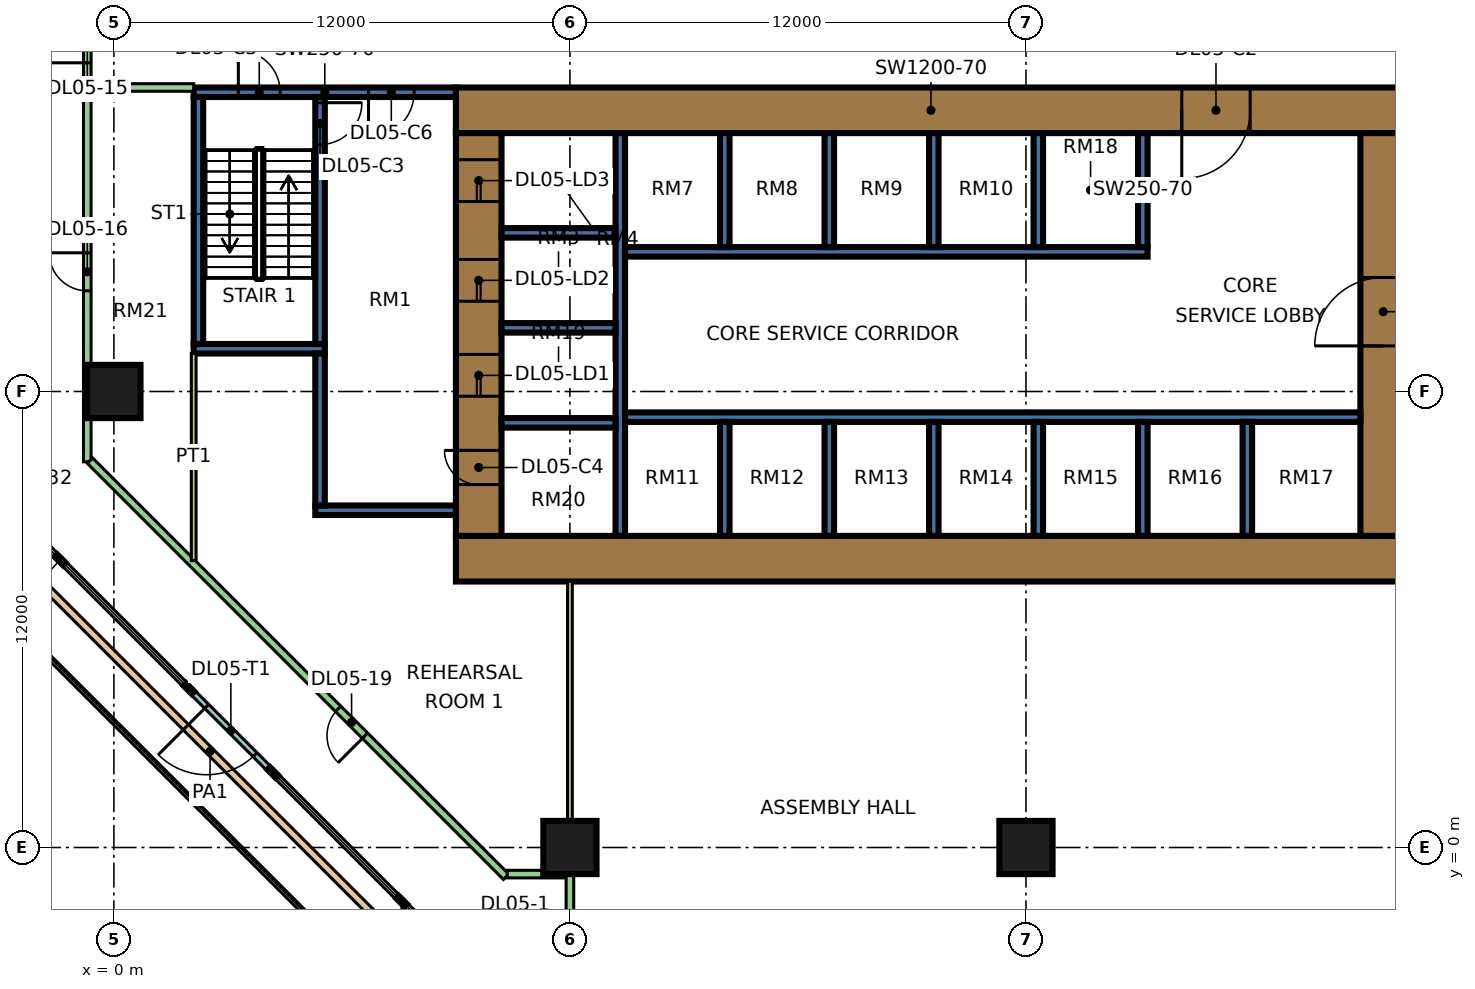
"""IFC4 building model, lengths in metres.
Left out: names, types, materials, properties, quantities, classifications, styles, units other than length and angle.
Written with IfcOpenShell. Run it as: python <this file> out.ifc"""

import sys

from ifc_helpers import new_model, si_unit, direction, frame, frame_2d, origin, origin_2d, place, context, subcontext, project, spatial, rectangle, extrude, element, fill, save


model = new_model("IFC4")
c1 = context("Model", 3, precision=1e-05, world=origin(), true_north=direction((0.0, 1.0)))
c2 = subcontext(c1, "Body", "Model", "MODEL_VIEW")
j1 = project(units=[si_unit("LENGTHUNIT", "METRE"), si_unit("PLANEANGLEUNIT", "RADIAN")], contexts=[c1])
p1 = place(None, origin())
s1 = spatial("IfcSite", under=j1, at=p1, CompositionType="ELEMENT")
p2 = place(p1, origin())
s2 = spatial("IfcBuilding", under=s1, at=p2, CompositionType="ELEMENT")
p3 = place(p2, frame((0.0, 0.0, 26.4)))
s3 = spatial("IfcBuildingStorey", under=s2, at=p3, CompositionType="ELEMENT", Elevation=26.4)
for number, where, z_axis, x_axis in (
    (1, (12.0, 0.0, 0.0), (0.0, 0.0, 1.0), (1.0, 0.0, 0.0)),
    (2, (24.0, 0.0, 0.0), (0.0, 0.0, 1.0), (1.0, 0.0, 0.0)),
    (3, (0.0, 12.0, 0.0), (0.0, 0.0, 1.0), (1.0, 0.0, 0.0)),
):
    element("IfcColumn", number, at=place(p3, frame(where, z_axis=z_axis, x_axis=x_axis)), inside=s3, PredefinedType="COLUMN", context=c2, shape_type="SweptSolid", body=[
        extrude(rectangle(XDim=1.4, YDim=1.4, at=origin_2d()), origin(), (0.0, 0.0, 1.0), 9.0),
    ])
p4 = place(p3, frame((9.0, 7.6, 0.0), z_axis=(0.0, 0.0, 1.0), x_axis=(1.0, 0.0, 0.0)))
e4 = element("IfcWall", 4, at=p4, inside=s3, PredefinedType="SHEAR", context=c2, shape_type="SweptSolid", body=[
    extrude(rectangle(XDim=25.0, YDim=1.2, at=frame_2d((12.5, 0.0))), origin(), (0.0, 0.0, 1.0), 9.0),
])
p5 = place(p3, frame((9.0, 19.4, 0.0), z_axis=(0.0, 0.0, 1.0), x_axis=(1.0, 0.0, 0.0)))
e5 = element("IfcWall", 5, at=p5, inside=s3, PredefinedType="SHEAR", context=c2, shape_type="SweptSolid", body=[
    extrude(rectangle(XDim=25.0, YDim=1.2, at=frame_2d((12.5, 0.0))), origin(), (0.0, 0.0, 1.0), 9.0),
])
p6 = place(p5, frame((19.1, 0.0, 0.0)))
e6 = element("IfcOpeningElement", 6, at=p6, cuts=e5, PredefinedType="OPENING", context=c2, shape_type="SweptSolid", body=[
    extrude(rectangle(XDim=1.8, YDim=2.4, at=frame_2d((0.9, 1.2))), frame((0.0, 0.61, 0.0), z_axis=(0.0, -1.0, 0.0), x_axis=(1.0, 0.0, 0.0)), (0.0, 0.0, 1.0), 1.22),
])
p7 = place(p3, frame((9.6, 8.2, 0.0), z_axis=(0.0, 0.0, 1.0), x_axis=(0.0, 1.0, 0.0)))
e7 = element("IfcWall", 7, at=p7, inside=s3, PredefinedType="SHEAR", context=c2, shape_type="SweptSolid", body=[
    extrude(rectangle(XDim=10.6, YDim=1.2, at=frame_2d((5.3, 0.0))), origin(), (0.0, 0.0, 1.0), 9.0),
])
p8 = place(p7, frame((3.675, 0.0, 0.0)))
e8 = element("IfcOpeningElement", 8, at=p8, cuts=e7, PredefinedType="OPENING", context=c2, shape_type="SweptSolid", body=[
    extrude(rectangle(XDim=1.1, YDim=2.2, at=frame_2d((0.55, 1.1))), frame((0.0, 0.61, 0.0), z_axis=(0.0, -1.0, 0.0), x_axis=(1.0, 0.0, 0.0)), (0.0, 0.0, 1.0), 1.22),
])
p9 = place(p7, frame((6.175, 0.0, 0.0)))
e9 = element("IfcOpeningElement", 9, at=p9, cuts=e7, PredefinedType="OPENING", context=c2, shape_type="SweptSolid", body=[
    extrude(rectangle(XDim=1.1, YDim=2.2, at=frame_2d((0.55, 1.1))), frame((0.0, 0.61, 0.0), z_axis=(0.0, -1.0, 0.0), x_axis=(1.0, 0.0, 0.0)), (0.0, 0.0, 1.0), 1.22),
])
p10 = place(p7, frame((8.8, 0.0, 0.0)))
e10 = element("IfcOpeningElement", 10, at=p10, cuts=e7, PredefinedType="OPENING", context=c2, shape_type="SweptSolid", body=[
    extrude(rectangle(XDim=1.1, YDim=2.2, at=frame_2d((0.55, 1.1))), frame((0.0, 0.61, 0.0), z_axis=(0.0, -1.0, 0.0), x_axis=(1.0, 0.0, 0.0)), (0.0, 0.0, 1.0), 1.22),
])
p11 = place(p7, frame((1.35, 0.0, 0.0)))
e11 = element("IfcOpeningElement", 11, at=p11, cuts=e7, PredefinedType="OPENING", context=c2, shape_type="SweptSolid", body=[
    extrude(rectangle(XDim=0.9, YDim=2.1, at=frame_2d((0.45, 1.05))), frame((0.0, 0.61, 0.0), z_axis=(0.0, -1.0, 0.0), x_axis=(1.0, 0.0, 0.0)), (0.0, 0.0, 1.0), 1.22),
])
p12 = place(p3, frame((33.4, 8.2, 0.0), z_axis=(0.0, 0.0, 1.0), x_axis=(0.0, 1.0, 0.0)))
e12 = element("IfcWall", 12, at=p12, inside=s3, PredefinedType="SHEAR", context=c2, shape_type="SweptSolid", body=[
    extrude(rectangle(XDim=10.6, YDim=1.2, at=frame_2d((5.3, 0.0))), origin(), (0.0, 0.0, 1.0), 9.0),
])
p13 = place(p12, frame((5.0, 0.0, 0.0)))
e13 = element("IfcOpeningElement", 13, at=p13, cuts=e12, PredefinedType="OPENING", context=c2, shape_type="SweptSolid", body=[
    extrude(rectangle(XDim=1.8, YDim=2.4, at=frame_2d((0.9, 1.2))), frame((0.0, 0.61, 0.0), z_axis=(0.0, -1.0, 0.0), x_axis=(1.0, 0.0, 0.0)), (0.0, 0.0, 1.0), 1.22),
])
p14 = place(p3, frame((13.325, 8.2, 0.0), z_axis=(0.0, 0.0, 1.0), x_axis=(0.0, 1.0, 0.0)))
e14 = element("IfcWall", 14, at=p14, inside=s3, PredefinedType="SHEAR", context=c2, shape_type="SweptSolid", body=[
    extrude(rectangle(XDim=10.6, YDim=0.25, at=frame_2d((5.3, 0.0))), origin(), (0.0, 0.0, 1.0), 9.0),
])
p15 = place(p3, frame((13.45, 11.325, 0.0), z_axis=(0.0, 0.0, 1.0), x_axis=(1.0, 0.0, 0.0)))
e15 = element("IfcWall", 15, at=p15, inside=s3, PredefinedType="SHEAR", context=c2, shape_type="SweptSolid", body=[
    extrude(rectangle(XDim=19.35, YDim=0.25, at=frame_2d((9.675, 0.0))), origin(), (0.0, 0.0, 1.0), 9.0),
])
p16 = place(p3, frame((13.45, 15.675, 0.0), z_axis=(0.0, 0.0, 1.0), x_axis=(1.0, 0.0, 0.0)))
e16 = element("IfcWall", 16, at=p16, inside=s3, PredefinedType="SHEAR", context=c2, shape_type="SweptSolid", body=[
    extrude(rectangle(XDim=13.75, YDim=0.25, at=frame_2d((6.875, 0.0))), origin(), (0.0, 0.0, 1.0), 9.0),
])
for number, where, z_axis, x_axis in (
    (17, (10.2, 11.175, 0.0), (0.0, 0.0, 1.0), (1.0, 0.0, 0.0)),
    (18, (10.2, 13.675, 0.0), (0.0, 0.0, 1.0), (1.0, 0.0, 0.0)),
    (19, (10.2, 16.175, 0.0), (0.0, 0.0, 1.0), (1.0, 0.0, 0.0)),
    (20, (16.075, 8.2, 0.0), (0.0, 0.0, 1.0), (0.0, 1.0, 0.0)),
    (21, (18.825, 8.2, 0.0), (0.0, 0.0, 1.0), (0.0, 1.0, 0.0)),
    (22, (21.575, 8.2, 0.0), (0.0, 0.0, 1.0), (0.0, 1.0, 0.0)),
    (23, (24.325, 8.2, 0.0), (0.0, 0.0, 1.0), (0.0, 1.0, 0.0)),
    (24, (27.075, 8.2, 0.0), (0.0, 0.0, 1.0), (0.0, 1.0, 0.0)),
    (25, (29.825, 8.2, 0.0), (0.0, 0.0, 1.0), (0.0, 1.0, 0.0)),
    (26, (16.075, 15.8, 0.0), (0.0, 0.0, 1.0), (0.0, 1.0, 0.0)),
    (27, (18.825, 15.8, 0.0), (0.0, 0.0, 1.0), (0.0, 1.0, 0.0)),
    (28, (21.575, 15.8, 0.0), (0.0, 0.0, 1.0), (0.0, 1.0, 0.0)),
    (29, (24.325, 15.8, 0.0), (0.0, 0.0, 1.0), (0.0, 1.0, 0.0)),
    (30, (27.075, 15.8, 0.0), (0.0, 0.0, 1.0), (0.0, 1.0, 0.0)),
):
    element("IfcWall", number, at=place(p3, frame(where, z_axis=z_axis, x_axis=x_axis)), inside=s3, PredefinedType="SHEAR", context=c2, shape_type="SweptSolid", body=[
        extrude(rectangle(XDim=3.0, YDim=0.25, at=frame_2d((1.5, 0.0))), origin(), (0.0, 0.0, 1.0), 9.0),
    ])
p17 = place(p3, frame((2.1, 19.875, 0.0), z_axis=(0.0, 0.0, 1.0), x_axis=(1.0, 0.0, 0.0)))
e31 = element("IfcWall", 31, at=p17, inside=s3, PredefinedType="SHEAR", context=c2, shape_type="SweptSolid", body=[
    extrude(rectangle(XDim=6.9, YDim=0.25, at=frame_2d((3.45, 0.0))), origin(), (0.0, 0.0, 1.0), 9.0),
])
p18 = place(p17, frame((1.175, 0.0, 0.0)))
e32 = element("IfcOpeningElement", 32, at=p18, cuts=e31, PredefinedType="OPENING", context=c2, shape_type="SweptSolid", body=[
    extrude(rectangle(XDim=1.1, YDim=2.2, at=frame_2d((0.55, 1.1))), frame((0.0, 0.135, 0.0), z_axis=(0.0, -1.0, 0.0), x_axis=(1.0, 0.0, 0.0)), (0.0, 0.0, 1.0), 0.27),
])
p19 = place(p17, frame((4.6, 0.0, 0.0)))
e33 = element("IfcOpeningElement", 33, at=p19, cuts=e31, PredefinedType="OPENING", context=c2, shape_type="SweptSolid", body=[
    extrude(rectangle(XDim=1.2, YDim=2.2, at=frame_2d((0.6, 1.1))), frame((0.0, 0.135, 0.0), z_axis=(0.0, -1.0, 0.0), x_axis=(1.0, 0.0, 0.0)), (0.0, 0.0, 1.0), 0.27),
])
p20 = place(p3, frame((2.1, 13.125, 0.0), z_axis=(0.0, 0.0, 1.0), x_axis=(1.0, 0.0, 0.0)))
e34 = element("IfcWall", 34, at=p20, inside=s3, PredefinedType="SHEAR", context=c2, shape_type="SweptSolid", body=[
    extrude(rectangle(XDim=3.45, YDim=0.25, at=frame_2d((1.725, 0.0))), origin(), (0.0, 0.0, 1.0), 9.0),
])
p21 = place(p3, frame((2.225, 13.25, 0.0), z_axis=(0.0, 0.0, 1.0), x_axis=(0.0, 1.0, 0.0)))
e35 = element("IfcWall", 35, at=p21, inside=s3, PredefinedType="SHEAR", context=c2, shape_type="SweptSolid", body=[
    extrude(rectangle(XDim=6.5, YDim=0.25, at=frame_2d((3.25, 0.0))), origin(), (0.0, 0.0, 1.0), 9.0),
])
p22 = place(p3, frame((5.425, 13.25, 0.0), z_axis=(0.0, 0.0, 1.0), x_axis=(0.0, 1.0, 0.0)))
e36 = element("IfcWall", 36, at=p22, inside=s3, PredefinedType="SHEAR", context=c2, shape_type="SweptSolid", body=[
    extrude(rectangle(XDim=6.5, YDim=0.25, at=frame_2d((3.25, 0.0))), origin(), (0.0, 0.0, 1.0), 9.0),
])
p23 = place(p22, frame((5.25, 0.0, 0.0)))
e37 = element("IfcOpeningElement", 37, at=p23, cuts=e36, PredefinedType="OPENING", context=c2, shape_type="SweptSolid", body=[
    extrude(rectangle(XDim=1.1, YDim=2.2, at=frame_2d((0.55, 1.1))), frame((0.0, 0.135, 0.0), z_axis=(0.0, -1.0, 0.0), x_axis=(1.0, 0.0, 0.0)), (0.0, 0.0, 1.0), 0.27),
])
p24 = place(p3, frame((5.3, 8.875, 0.0), z_axis=(0.0, 0.0, 1.0), x_axis=(1.0, 0.0, 0.0)))
e38 = element("IfcWall", 38, at=p24, inside=s3, PredefinedType="SHEAR", context=c2, shape_type="SweptSolid", body=[
    extrude(rectangle(XDim=3.7, YDim=0.25, at=frame_2d((1.85, 0.0))), origin(), (0.0, 0.0, 1.0), 9.0),
])
p25 = place(p3, frame((5.425, 9.0, 0.0), z_axis=(0.0, 0.0, 1.0), x_axis=(0.0, 1.0, 0.0)))
e39 = element("IfcWall", 39, at=p25, inside=s3, PredefinedType="SHEAR", context=c2, shape_type="SweptSolid", body=[
    extrude(rectangle(XDim=4.0, YDim=0.25, at=frame_2d((2.0, 0.0))), origin(), (0.0, 0.0, 1.0), 9.0),
])
p26 = place(p3, frame((2.018, 4.139, 0.0), z_axis=(0.0, 0.0, 1.0), x_axis=(0.707106781187, -0.707106781187, 0.0)))
e40 = element("IfcWall", 40, at=p26, inside=s3, PredefinedType="SOLIDWALL", context=c2, shape_type="SweptSolid", body=[
    extrude(rectangle(XDim=3.0, YDim=0.15, at=frame_2d((1.5, 0.0))), origin(), (0.0, 0.0, 1.0), 8.45),
])
p27 = place(p26, frame((0.6, 0.0, 0.0)))
e41 = element("IfcOpeningElement", 41, at=p27, cuts=e40, PredefinedType="OPENING", context=c2, shape_type="SweptSolid", body=[
    extrude(rectangle(XDim=1.8, YDim=2.4, at=frame_2d((0.9, 1.2))), frame((0.0, 0.085, 0.0), z_axis=(0.0, -1.0, 0.0), x_axis=(1.0, 0.0, 0.0)), (0.0, 0.0, 1.0), 0.17),
])
p28 = place(p3, frame((10.76, -5.7, 0.0), z_axis=(0.0, 0.0, 1.0), x_axis=(-0.707106781187, 0.707106781187, 0.0)))
e42 = element("IfcWall", 42, at=p28, inside=s3, PredefinedType="PARAPET", context=c2, shape_type="SweptSolid", body=[
    extrude(rectangle(XDim=23.278, YDim=0.2, at=frame_2d((11.639, 0.0))), origin(), (0.0, 0.0, 1.0), 0.5),
])
p29 = place(p3, frame((-0.7, 10.15, 0.0), z_axis=(0.0, 0.0, 1.0), x_axis=(0.0, 1.0, 0.0)))
e43 = element("IfcWall", 43, at=p29, inside=s3, PredefinedType="PARTITIONING", context=c2, shape_type="SweptSolid", body=[
    extrude(rectangle(XDim=15.85, YDim=0.2, at=frame_2d((7.925, 0.0))), origin(), (0.0, 0.0, 1.0), 8.45),
])
p30 = place(p29, frame((10.5, 0.0, 0.0)))
e44 = element("IfcOpeningElement", 44, at=p30, cuts=e43, PredefinedType="OPENING", context=c2, shape_type="SweptSolid", body=[
    extrude(rectangle(XDim=1.8, YDim=2.1, at=frame_2d((0.9, 1.05))), frame((0.0, 0.11, 0.0), z_axis=(0.0, -1.0, 0.0), x_axis=(1.0, 0.0, 0.0)), (0.0, 0.0, 1.0), 0.22),
])
p31 = place(p29, frame((4.5, 0.0, 0.0)))
e45 = element("IfcOpeningElement", 45, at=p31, cuts=e43, PredefinedType="OPENING", context=c2, shape_type="SweptSolid", body=[
    extrude(rectangle(XDim=1.0, YDim=2.1, at=frame_2d((0.5, 1.05))), frame((0.0, 0.11, 0.0), z_axis=(0.0, -1.0, 0.0), x_axis=(1.0, 0.0, 0.0)), (0.0, 0.0, 1.0), 0.22),
])
p32 = place(p3, frame((-0.629, 10.179, 0.0), z_axis=(0.0, 0.0, 1.0), x_axis=(0.707106781187, -0.707106781187, 0.0)))
e46 = element("IfcWall", 46, at=p32, inside=s3, PredefinedType="PARTITIONING", context=c2, shape_type="SweptSolid", body=[
    extrude(rectangle(XDim=15.486, YDim=0.2, at=frame_2d((7.743, 0.0))), origin(), (0.0, 0.0, 1.0), 8.45),
])
p33 = place(p32, frame((9.235, 0.0, 0.0)))
e47 = element("IfcOpeningElement", 47, at=p33, cuts=e46, PredefinedType="OPENING", context=c2, shape_type="SweptSolid", body=[
    extrude(rectangle(XDim=1.0, YDim=2.1, at=frame_2d((0.5, 1.05))), frame((0.0, 0.11, 0.0), z_axis=(0.0, -1.0, 0.0), x_axis=(1.0, 0.0, 0.0)), (0.0, 0.0, 1.0), 0.22),
])
p34 = place(p3, frame((-0.6, 20.0, 0.0), z_axis=(0.0, 0.0, 1.0), x_axis=(1.0, 0.0, 0.0)))
e48 = element("IfcWall", 48, at=p34, inside=s3, PredefinedType="PARTITIONING", context=c2, shape_type="SweptSolid", body=[
    extrude(rectangle(XDim=2.7, YDim=0.2, at=frame_2d((1.35, 0.0))), origin(), (0.0, 0.0, 1.0), 8.45),
])
p35 = place(p3, frame((2.1, 7.55, 0.0), z_axis=(0.0, 0.0, 1.0), x_axis=(0.0, 1.0, 0.0)))
e49 = element("IfcWall", 49, at=p35, inside=s3, PredefinedType="PARTITIONING", context=c2, shape_type="SweptSolid", body=[
    extrude(rectangle(XDim=5.45, YDim=0.125, at=frame_2d((2.725, 0.0))), origin(), (0.0, 0.0, 1.0), 8.45),
])
p36 = place(p3, frame((10.35, -0.7, 0.0), z_axis=(0.0, 0.0, 1.0), x_axis=(1.0, 0.0, 0.0)))
e50 = element("IfcWall", 50, at=p36, inside=s3, PredefinedType="PARTITIONING", context=c2, shape_type="SweptSolid", body=[
    extrude(rectangle(XDim=1.55, YDim=0.2, at=frame_2d((0.775, 0.0))), origin(), (0.0, 0.0, 1.0), 8.45),
])
p37 = place(p3, frame((12.0, -3.0, 0.0), z_axis=(0.0, 0.0, 1.0), x_axis=(0.0, 1.0, 0.0)))
e51 = element("IfcWall", 51, at=p37, inside=s3, PredefinedType="PARTITIONING", context=c2, shape_type="SweptSolid", body=[
    extrude(rectangle(XDim=2.3, YDim=0.2, at=frame_2d((1.15, 0.0))), origin(), (0.0, 0.0, 1.0), 8.45),
])
p38 = place(p3, frame((12.0, -0.7, 0.0), z_axis=(0.0, 0.0, 1.0), x_axis=(0.0, 1.0, 0.0)))
e52 = element("IfcWall", 52, at=p38, inside=s3, PredefinedType="PARTITIONING", context=c2, shape_type="SweptSolid", body=[
    extrude(rectangle(XDim=7.7, YDim=0.125, at=frame_2d((3.85, 0.0))), origin(), (0.0, 0.0, 1.0), 8.45),
])
p39 = place(p27, frame((1.8, 0.0, 0.0), z_axis=(0.0, 0.0, 1.0), x_axis=(-1.0, 0.0, 0.0)))
e53 = element("IfcDoor", 53, at=p39, inside=s3, OperationType="DOUBLE_DOOR_SINGLE_SWING", PredefinedType="DOOR", context=c2, shape_type="SweptSolid", body=[
    extrude(rectangle(XDim=1.8, YDim=2.4, at=frame_2d((0.9, 1.2))), frame((0.0, 0.025, 0.0), z_axis=(0.0, -1.0, 0.0), x_axis=(1.0, 0.0, 0.0)), (0.0, 0.0, 1.0), 0.05),
])
fill(e41, e53)
p40 = place(p8, origin())
e54 = element("IfcDoor", 54, at=p40, inside=s3, OperationType="DOUBLE_DOOR_SLIDING", PredefinedType="DOOR", context=c2, shape_type="SweptSolid", body=[
    extrude(rectangle(XDim=1.1, YDim=2.2, at=frame_2d((0.55, 1.1))), frame((0.0, 0.025, 0.0), z_axis=(0.0, -1.0, 0.0), x_axis=(1.0, 0.0, 0.0)), (0.0, 0.0, 1.0), 0.05),
])
fill(e8, e54)
p41 = place(p9, origin())
e55 = element("IfcDoor", 55, at=p41, inside=s3, OperationType="DOUBLE_DOOR_SLIDING", PredefinedType="DOOR", context=c2, shape_type="SweptSolid", body=[
    extrude(rectangle(XDim=1.1, YDim=2.2, at=frame_2d((0.55, 1.1))), frame((0.0, 0.025, 0.0), z_axis=(0.0, -1.0, 0.0), x_axis=(1.0, 0.0, 0.0)), (0.0, 0.0, 1.0), 0.05),
])
fill(e9, e55)
p42 = place(p10, origin())
e56 = element("IfcDoor", 56, at=p42, inside=s3, OperationType="DOUBLE_DOOR_SLIDING", PredefinedType="DOOR", context=c2, shape_type="SweptSolid", body=[
    extrude(rectangle(XDim=1.1, YDim=2.2, at=frame_2d((0.55, 1.1))), frame((0.0, 0.025, 0.0), z_axis=(0.0, -1.0, 0.0), x_axis=(1.0, 0.0, 0.0)), (0.0, 0.0, 1.0), 0.05),
])
fill(e10, e56)
p43 = place(p13, origin())
e57 = element("IfcDoor", 57, at=p43, inside=s3, OperationType="DOUBLE_DOOR_SINGLE_SWING", PredefinedType="DOOR", context=c2, shape_type="SweptSolid", body=[
    extrude(rectangle(XDim=1.8, YDim=2.4, at=frame_2d((0.9, 1.2))), frame((0.0, 0.025, 0.0), z_axis=(0.0, -1.0, 0.0), x_axis=(1.0, 0.0, 0.0)), (0.0, 0.0, 1.0), 0.05),
])
fill(e13, e57)
p44 = place(p6, frame((1.8, 0.0, 0.0), z_axis=(0.0, 0.0, 1.0), x_axis=(-1.0, 0.0, 0.0)))
e58 = element("IfcDoor", 58, at=p44, inside=s3, OperationType="DOUBLE_DOOR_SINGLE_SWING", PredefinedType="DOOR", context=c2, shape_type="SweptSolid", body=[
    extrude(rectangle(XDim=1.8, YDim=2.4, at=frame_2d((0.9, 1.2))), frame((0.0, 0.025, 0.0), z_axis=(0.0, -1.0, 0.0), x_axis=(1.0, 0.0, 0.0)), (0.0, 0.0, 1.0), 0.05),
])
fill(e6, e58)
p45 = place(p23, origin())
e59 = element("IfcDoor", 59, at=p45, inside=s3, OperationType="SINGLE_SWING_RIGHT", PredefinedType="DOOR", context=c2, shape_type="SweptSolid", body=[
    extrude(rectangle(XDim=1.1, YDim=2.2, at=frame_2d((0.55, 1.1))), frame((0.0, 0.025, 0.0), z_axis=(0.0, -1.0, 0.0), x_axis=(1.0, 0.0, 0.0)), (0.0, 0.0, 1.0), 0.05),
])
fill(e37, e59)
p46 = place(p11, frame((0.9, 0.0, 0.0), z_axis=(0.0, 0.0, 1.0), x_axis=(-1.0, 0.0, 0.0)))
e60 = element("IfcDoor", 60, at=p46, inside=s3, OperationType="SINGLE_SWING_RIGHT", PredefinedType="DOOR", context=c2, shape_type="SweptSolid", body=[
    extrude(rectangle(XDim=0.9, YDim=2.1, at=frame_2d((0.45, 1.05))), frame((0.0, 0.025, 0.0), z_axis=(0.0, -1.0, 0.0), x_axis=(1.0, 0.0, 0.0)), (0.0, 0.0, 1.0), 0.05),
])
fill(e11, e60)
p47 = place(p18, origin())
e61 = element("IfcDoor", 61, at=p47, inside=s3, OperationType="SINGLE_SWING_LEFT", PredefinedType="DOOR", context=c2, shape_type="SweptSolid", body=[
    extrude(rectangle(XDim=1.1, YDim=2.2, at=frame_2d((0.55, 1.1))), frame((0.0, 0.025, 0.0), z_axis=(0.0, -1.0, 0.0), x_axis=(1.0, 0.0, 0.0)), (0.0, 0.0, 1.0), 0.05),
])
fill(e32, e61)
p48 = place(p19, frame((1.2, 0.0, 0.0), z_axis=(0.0, 0.0, 1.0), x_axis=(-1.0, 0.0, 0.0)))
e62 = element("IfcDoor", 62, at=p48, inside=s3, OperationType="SINGLE_SWING_LEFT", PredefinedType="DOOR", context=c2, shape_type="SweptSolid", body=[
    extrude(rectangle(XDim=1.2, YDim=2.2, at=frame_2d((0.6, 1.1))), frame((0.0, 0.025, 0.0), z_axis=(0.0, -1.0, 0.0), x_axis=(1.0, 0.0, 0.0)), (0.0, 0.0, 1.0), 0.05),
])
fill(e33, e62)
p49 = place(p30, origin())
e63 = element("IfcDoor", 63, at=p49, inside=s3, OperationType="DOUBLE_DOOR_SINGLE_SWING", PredefinedType="DOOR", context=c2, shape_type="SweptSolid", body=[
    extrude(rectangle(XDim=1.8, YDim=2.1, at=frame_2d((0.9, 1.05))), frame((0.0, 0.025, 0.0), z_axis=(0.0, -1.0, 0.0), x_axis=(1.0, 0.0, 0.0)), (0.0, 0.0, 1.0), 0.05),
])
fill(e44, e63)
p50 = place(p31, frame((1.0, 0.0, 0.0), z_axis=(0.0, 0.0, 1.0), x_axis=(-1.0, 0.0, 0.0)))
e64 = element("IfcDoor", 64, at=p50, inside=s3, OperationType="SINGLE_SWING_RIGHT", PredefinedType="DOOR", context=c2, shape_type="SweptSolid", body=[
    extrude(rectangle(XDim=1.0, YDim=2.1, at=frame_2d((0.5, 1.05))), frame((0.0, 0.025, 0.0), z_axis=(0.0, -1.0, 0.0), x_axis=(1.0, 0.0, 0.0)), (0.0, 0.0, 1.0), 0.05),
])
fill(e45, e64)
p51 = place(p33, origin())
e65 = element("IfcDoor", 65, at=p51, inside=s3, OperationType="SINGLE_SWING_RIGHT", PredefinedType="DOOR", context=c2, shape_type="SweptSolid", body=[
    extrude(rectangle(XDim=1.0, YDim=2.1, at=frame_2d((0.5, 1.05))), frame((0.0, 0.025, 0.0), z_axis=(0.0, -1.0, 0.0), x_axis=(1.0, 0.0, 0.0)), (0.0, 0.0, 1.0), 0.05),
])
fill(e47, e65)
save(model, sys.argv[1])
